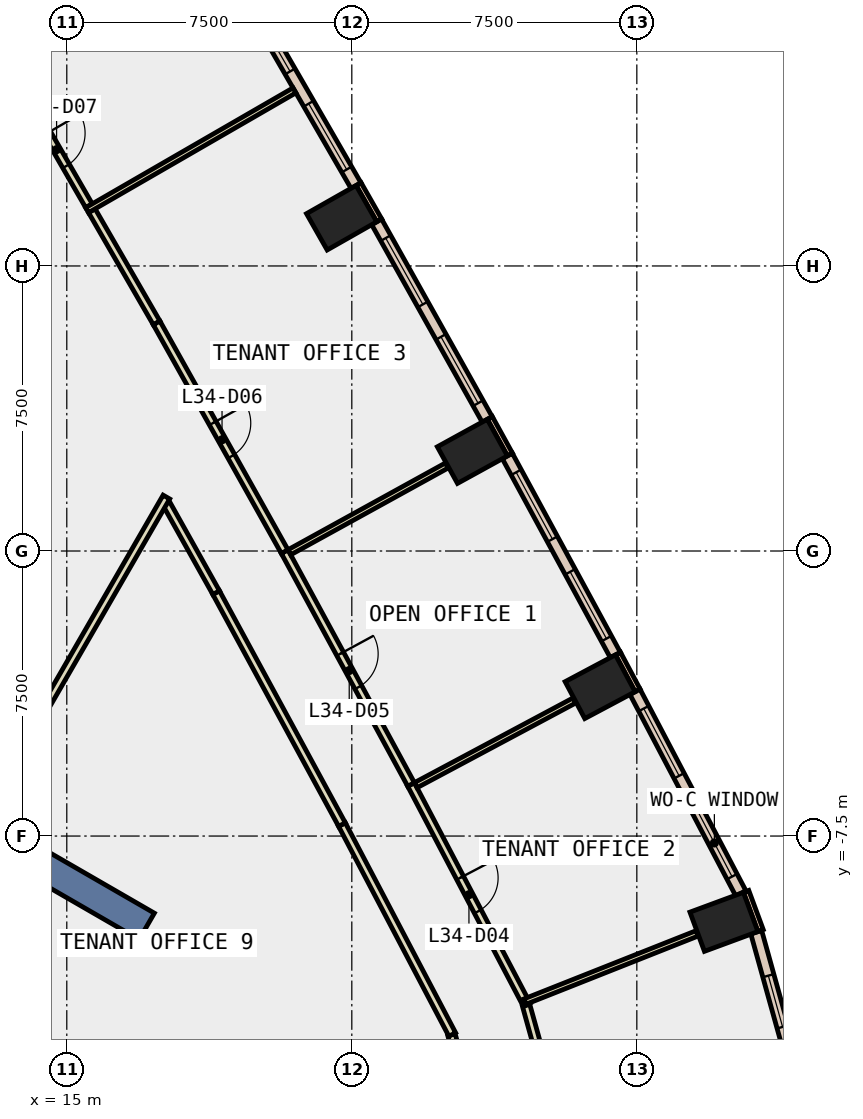
"""IFC4 building model, lengths in metres.
Left out: names, types, materials, properties, quantities, classifications, styles, units other than length and angle.
Written with IfcOpenShell. Run it as: python <this file> out.ifc"""

import sys

from ifc_helpers import new_model, si_unit, direction, frame, frame_2d, origin, origin_2d, place, context, subcontext, project, spatial, rectangle, extrude, element, fill, save


model = new_model("IFC4")
c1 = context("Model", 3, precision=1e-05, world=origin(), true_north=direction((0.0, 1.0)))
c2 = subcontext(c1, "Body", "Model", "MODEL_VIEW")
j1 = project(units=[si_unit("LENGTHUNIT", "METRE"), si_unit("PLANEANGLEUNIT", "RADIAN")], contexts=[c1])
p1 = place(None, origin())
s1 = spatial("IfcSite", under=j1, at=p1, CompositionType="ELEMENT")
p2 = place(p1, origin())
s2 = spatial("IfcBuilding", under=s1, at=p2, CompositionType="ELEMENT")
p3 = place(p2, frame((0.0, 0.0, 155.0)))
s3 = spatial("IfcBuildingStorey", under=s2, at=p3, CompositionType="ELEMENT", Elevation=155.0)
for number, where, z_axis, x_axis in (
    (1, (32.292, -9.758, -0.4), (0.0, 0.0, 1.0), (-0.347, 0.938, 0.0)),
    (2, (29.034, -3.571, -0.4), (0.0, 0.0, 1.0), (-0.47, 0.883, 0.0)),
    (3, (25.673, 2.622, -0.4), (0.0, 0.0, 1.0), (-0.482, 0.876, 0.0)),
    (4, (22.232, 8.769, -0.4), (0.0, 0.0, 1.0), (-0.494, 0.869, 0.0)),
):
    element("IfcColumn", number, at=place(p3, frame(where, z_axis=z_axis, x_axis=x_axis)), inside=s3, PredefinedType="COLUMN", context=c2, shape_type="SweptSolid", body=[
        extrude(rectangle(XDim=1.1, YDim=1.5, at=origin_2d()), origin(), (0.0, 0.0, 1.0), 4.2),
    ])
p4 = place(p3, frame((9.31, -5.375, -0.4), z_axis=(0.0, 0.0, 1.0), x_axis=(0.866017533419, -0.500013631625, 0.0)))
e5 = element("IfcWall", 5, at=p4, inside=s3, PredefinedType="SHEAR", context=c2, shape_type="SweptSolid", body=[
    extrude(rectangle(XDim=9.0, YDim=0.8, at=frame_2d((4.5, 0.0))), origin(), (0.0, 0.0, 1.0), 4.2),
])
for number, where, z_axis, x_axis in (
    (6, (33.256, -9.988, 0.0), (0.0, 0.0, 1.0), (-0.346, 0.938, 0.0)),
    (7, (30.02, -3.669, 0.0), (0.0, 0.0, 1.0), (-0.47, 0.883, 0.0)),
):
    element("IfcWall", number, at=place(p3, frame(where, z_axis=z_axis, x_axis=x_axis)), inside=s3, PredefinedType="STANDARD", context=c2, shape_type="SweptSolid", body=[
        extrude(rectangle(XDim=1.1, YDim=0.15, at=frame_2d((0.55, 0.0))), origin(), (0.0, 0.0, 1.0), 3.8),
    ])
for number, where, z_axis, x_axis in (
    (8, (26.661, 2.538, 0.0), (0.0, 0.0, 1.0), (-0.482, 0.876, 0.0)),
    (9, (23.222, 8.699, 0.0), (0.0, 0.0, 1.0), (-0.495, 0.869, 0.0)),
):
    element("IfcWall", number, at=place(p3, frame(where, z_axis=z_axis, x_axis=x_axis)), inside=s3, PredefinedType="STANDARD", context=c2, shape_type="SweptSolid", body=[
        extrude(rectangle(XDim=1.1, YDim=0.15, at=frame_2d((0.55, 0.0))), origin(), (0.0, 0.0, 1.0), 3.8),
    ])
p5 = place(p3, frame((34.154, -13.667, 0.0), z_axis=(0.0, 0.0, 1.0), x_axis=(-0.26799398221, 0.963420585985, 0.0)))
e10 = element("IfcWall", 10, at=p5, inside=s3, PredefinedType="STANDARD", context=c2, shape_type="SweptSolid", body=[
    extrude(rectangle(XDim=3.776, YDim=0.3, at=frame_2d((1.888, 0.0))), origin(), (0.0, 0.0, 1.0), 3.8),
])
p6 = place(p5, frame((1.188, 0.0, 0.9)))
e11 = element("IfcOpeningElement", 11, at=p6, cuts=e10, PredefinedType="OPENING", context=c2, shape_type="SweptSolid", body=[
    extrude(rectangle(XDim=1.4, YDim=2.6, at=frame_2d((0.7, 1.3))), frame((0.0, 0.16, 0.0), z_axis=(0.0, -1.0, 0.0), x_axis=(1.0, 0.0, 0.0)), (0.0, 0.0, 1.0), 0.32),
])
p7 = place(p3, frame((32.737, -9.008, 0.0), z_axis=(0.0, 0.0, 1.0), x_axis=(-0.465104650407, 0.885255705528, 0.0)))
e12 = element("IfcWall", 12, at=p7, inside=s3, PredefinedType="STANDARD", context=c2, shape_type="SweptSolid", body=[
    extrude(rectangle(XDim=5.99, YDim=0.3, at=frame_2d((2.995, 0.0))), origin(), (0.0, 0.0, 1.0), 3.8),
])
p8 = place(p7, frame((0.498, 0.0, 0.9)))
e13 = element("IfcOpeningElement", 13, at=p8, cuts=e12, PredefinedType="OPENING", context=c2, shape_type="SweptSolid", body=[
    extrude(rectangle(XDim=2.0, YDim=2.6, at=frame_2d((1.0, 1.3))), frame((0.0, 0.16, 0.0), z_axis=(0.0, -1.0, 0.0), x_axis=(1.0, 0.0, 0.0)), (0.0, 0.0, 1.0), 0.32),
])
p9 = place(p7, frame((3.493, 0.0, 0.9)))
e14 = element("IfcOpeningElement", 14, at=p9, cuts=e12, PredefinedType="OPENING", context=c2, shape_type="SweptSolid", body=[
    extrude(rectangle(XDim=2.0, YDim=2.6, at=frame_2d((1.0, 1.3))), frame((0.0, 0.16, 0.0), z_axis=(0.0, -1.0, 0.0), x_axis=(1.0, 0.0, 0.0)), (0.0, 0.0, 1.0), 0.32),
])
p10 = place(p3, frame((29.434, -2.736, 0.0), z_axis=(0.0, 0.0, 1.0), x_axis=(-0.476970695077, 0.878919197673, 0.0)))
e15 = element("IfcWall", 15, at=p10, inside=s3, PredefinedType="STANDARD", context=c2, shape_type="SweptSolid", body=[
    extrude(rectangle(XDim=5.958, YDim=0.3, at=frame_2d((2.979, 0.0))), origin(), (0.0, 0.0, 1.0), 3.8),
])
p11 = place(p10, frame((0.49, 0.0, 0.9)))
e16 = element("IfcOpeningElement", 16, at=p11, cuts=e15, PredefinedType="OPENING", context=c2, shape_type="SweptSolid", body=[
    extrude(rectangle(XDim=2.0, YDim=2.6, at=frame_2d((1.0, 1.3))), frame((0.0, 0.16, 0.0), z_axis=(0.0, -1.0, 0.0), x_axis=(1.0, 0.0, 0.0)), (0.0, 0.0, 1.0), 0.32),
])
p12 = place(p10, frame((3.469, 0.0, 0.9)))
e17 = element("IfcOpeningElement", 17, at=p12, cuts=e15, PredefinedType="OPENING", context=c2, shape_type="SweptSolid", body=[
    extrude(rectangle(XDim=2.0, YDim=2.6, at=frame_2d((1.0, 1.3))), frame((0.0, 0.16, 0.0), z_axis=(0.0, -1.0, 0.0), x_axis=(1.0, 0.0, 0.0)), (0.0, 0.0, 1.0), 0.32),
])
p13 = place(p3, frame((26.062, 3.463, 0.0), z_axis=(0.0, 0.0, 1.0), x_axis=(-0.488354983501, 0.872645065356, 0.0)))
e18 = element("IfcWall", 18, at=p13, inside=s3, PredefinedType="STANDARD", context=c2, shape_type="SweptSolid", body=[
    extrude(rectangle(XDim=5.957, YDim=0.3, at=frame_2d((2.978, 0.0))), origin(), (0.0, 0.0, 1.0), 3.8),
])
p14 = place(p13, frame((0.489, 0.0, 0.9)))
e19 = element("IfcOpeningElement", 19, at=p14, cuts=e18, PredefinedType="OPENING", context=c2, shape_type="SweptSolid", body=[
    extrude(rectangle(XDim=2.0, YDim=2.6, at=frame_2d((1.0, 1.3))), frame((0.0, 0.16, 0.0), z_axis=(0.0, -1.0, 0.0), x_axis=(1.0, 0.0, 0.0)), (0.0, 0.0, 1.0), 0.32),
])
p15 = place(p13, frame((3.467, 0.0, 0.9)))
e20 = element("IfcOpeningElement", 20, at=p15, cuts=e18, PredefinedType="OPENING", context=c2, shape_type="SweptSolid", body=[
    extrude(rectangle(XDim=2.0, YDim=2.6, at=frame_2d((1.0, 1.3))), frame((0.0, 0.16, 0.0), z_axis=(0.0, -1.0, 0.0), x_axis=(1.0, 0.0, 0.0)), (0.0, 0.0, 1.0), 0.32),
])
p16 = place(p3, frame((22.61, 9.615, 0.0), z_axis=(0.0, 0.0, 1.0), x_axis=(-0.500061823953, 0.865989706766, 0.0)))
e21 = element("IfcWall", 21, at=p16, inside=s3, PredefinedType="STANDARD", context=c2, shape_type="SweptSolid", body=[
    extrude(rectangle(XDim=5.957, YDim=0.3, at=frame_2d((2.979, 0.0))), origin(), (0.0, 0.0, 1.0), 3.8),
])
p17 = place(p16, frame((0.489, 0.0, 0.9)))
e22 = element("IfcOpeningElement", 22, at=p17, cuts=e21, PredefinedType="OPENING", context=c2, shape_type="SweptSolid", body=[
    extrude(rectangle(XDim=2.0, YDim=2.6, at=frame_2d((1.0, 1.3))), frame((0.0, 0.16, 0.0), z_axis=(0.0, -1.0, 0.0), x_axis=(1.0, 0.0, 0.0)), (0.0, 0.0, 1.0), 0.32),
])
p18 = place(p16, frame((3.468, 0.0, 0.9)))
e23 = element("IfcOpeningElement", 23, at=p18, cuts=e21, PredefinedType="OPENING", context=c2, shape_type="SweptSolid", body=[
    extrude(rectangle(XDim=2.0, YDim=2.6, at=frame_2d((1.0, 1.3))), frame((0.0, 0.16, 0.0), z_axis=(0.0, -1.0, 0.0), x_axis=(1.0, 0.0, 0.0)), (0.0, 0.0, 1.0), 0.32),
])
p19 = place(p3, frame((25.586, -14.393, 0.0), z_axis=(0.0, 0.0, 1.0), x_axis=(-0.268139825244, 0.963380005044, 0.0)))
e24 = element("IfcWall", 24, at=p19, inside=s3, PredefinedType="PARTITIONING", context=c2, shape_type="SweptSolid", body=[
    extrude(rectangle(XDim=1.726, YDim=0.2, at=frame_2d((0.863, 0.0))), origin(), (0.0, 0.0, 1.0), 3.8),
])
p20 = place(p3, frame((25.143, -12.722, 0.0), z_axis=(0.0, 0.0, 1.0), x_axis=(-0.465089990515, 0.885263407536, 0.0)))
e25 = element("IfcWall", 25, at=p20, inside=s3, PredefinedType="PARTITIONING", context=c2, shape_type="SweptSolid", body=[
    extrude(rectangle(XDim=6.24, YDim=0.2, at=frame_2d((3.12, 0.0))), origin(), (0.0, 0.0, 1.0), 3.8),
])
p21 = place(p3, frame((22.241, -7.198, 0.0), z_axis=(0.0, 0.0, 1.0), x_axis=(-0.476865268044, 0.878976402489, 0.0)))
e26 = element("IfcWall", 26, at=p21, inside=s3, PredefinedType="PARTITIONING", context=c2, shape_type="SweptSolid", body=[
    extrude(rectangle(XDim=6.943, YDim=0.2, at=frame_2d((3.472, 0.0))), origin(), (0.0, 0.0, 1.0), 3.8),
])
p22 = place(p3, frame((18.93, -1.095, 0.0), z_axis=(0.0, 0.0, 1.0), x_axis=(-0.488268004118, 0.872693735599, 0.0)))
e27 = element("IfcWall", 27, at=p22, inside=s3, PredefinedType="PARTITIONING", context=c2, shape_type="SweptSolid", body=[
    extrude(rectangle(XDim=2.683, YDim=0.2, at=frame_2d((1.341, 0.0))), origin(), (0.0, 0.0, 1.0), 3.8),
])
p23 = place(p3, frame((27.086, -11.952, 0.0), z_axis=(0.0, 0.0, 1.0), x_axis=(0.267909096687, -0.963444194498, 0.0)))
e28 = element("IfcWall", 28, at=p23, inside=s3, PredefinedType="PARTITIONING", context=c2, shape_type="SweptSolid", body=[
    extrude(rectangle(XDim=2.516, YDim=0.2, at=frame_2d((1.258, 0.0))), origin(), (0.0, 0.0, 1.0), 3.8),
])
p24 = place(p3, frame((24.059, -6.143, 0.0), z_axis=(0.0, 0.0, 1.0), x_axis=(0.464993808059, -0.885313932154, 0.0)))
e29 = element("IfcWall", 29, at=p24, inside=s3, PredefinedType="PARTITIONING", context=c2, shape_type="SweptSolid", body=[
    extrude(rectangle(XDim=6.552, YDim=0.2, at=frame_2d((3.276, 0.0))), origin(), (0.0, 0.0, 1.0), 3.8),
])
p25 = place(p24, frame((2.776, 0.0, 0.0)))
e30 = element("IfcOpeningElement", 30, at=p25, cuts=e29, PredefinedType="OPENING", context=c2, shape_type="SweptSolid", body=[
    extrude(rectangle(XDim=1.0, YDim=2.1, at=frame_2d((0.5, 1.05))), frame((0.0, 0.11, 0.0), z_axis=(0.0, -1.0, 0.0), x_axis=(1.0, 0.0, 0.0)), (0.0, 0.0, 1.0), 0.22),
])
p26 = place(p3, frame((20.733, -0.016, 0.0), z_axis=(0.0, 0.0, 1.0), x_axis=(0.477104227839, -0.87884671916, 0.0)))
e31 = element("IfcWall", 31, at=p26, inside=s3, PredefinedType="PARTITIONING", context=c2, shape_type="SweptSolid", body=[
    extrude(rectangle(XDim=6.972, YDim=0.2, at=frame_2d((3.486, 0.0))), origin(), (0.0, 0.0, 1.0), 3.8),
])
p27 = place(p26, frame((3.061, 0.0, 0.0)))
e32 = element("IfcOpeningElement", 32, at=p27, cuts=e31, PredefinedType="OPENING", context=c2, shape_type="SweptSolid", body=[
    extrude(rectangle(XDim=1.0, YDim=2.1, at=frame_2d((0.5, 1.05))), frame((0.0, 0.11, 0.0), z_axis=(0.0, -1.0, 0.0), x_axis=(1.0, 0.0, 0.0)), (0.0, 0.0, 1.0), 0.22),
])
p28 = place(p3, frame((15.659, 8.954, 0.0), z_axis=(0.0, 0.0, 1.0), x_axis=(0.50001992892, -0.866013897511, 0.0)))
e33 = element("IfcWall", 33, at=p28, inside=s3, PredefinedType="PARTITIONING", context=c2, shape_type="SweptSolid", body=[
    extrude(rectangle(XDim=3.41, YDim=0.2, at=frame_2d((1.705, 0.0))), origin(), (0.0, 0.0, 1.0), 3.8),
])
p29 = place(p3, frame((17.364, 6.001, 0.0), z_axis=(0.0, 0.0, 1.0), x_axis=(0.488528981592, -0.872547668695, 0.0)))
e34 = element("IfcWall", 34, at=p29, inside=s3, PredefinedType="PARTITIONING", context=c2, shape_type="SweptSolid", body=[
    extrude(rectangle(XDim=6.896, YDim=0.2, at=frame_2d((3.448, 0.0))), origin(), (0.0, 0.0, 1.0), 3.8),
])
p30 = place(p29, frame((3.023, 0.0, 0.0)))
e35 = element("IfcOpeningElement", 35, at=p30, cuts=e34, PredefinedType="OPENING", context=c2, shape_type="SweptSolid", body=[
    extrude(rectangle(XDim=1.0, YDim=2.1, at=frame_2d((0.5, 1.05))), frame((0.0, 0.11, 0.0), z_axis=(0.0, -1.0, 0.0), x_axis=(1.0, 0.0, 0.0)), (0.0, 0.0, 1.0), 0.22),
])
p31 = place(p3, frame((13.879, 12.037, 0.0), z_axis=(0.0, 0.0, 1.0), x_axis=(0.50001992892, -0.866013897511, 0.0)))
e36 = element("IfcWall", 36, at=p31, inside=s3, PredefinedType="PARTITIONING", context=c2, shape_type="SweptSolid", body=[
    extrude(rectangle(XDim=3.41, YDim=0.2, at=frame_2d((1.705, 0.0))), origin(), (0.0, 0.0, 1.0), 3.8),
])
p32 = place(p31, frame((1.205, 0.0, 0.0)))
e37 = element("IfcOpeningElement", 37, at=p32, cuts=e36, PredefinedType="OPENING", context=c2, shape_type="SweptSolid", body=[
    extrude(rectangle(XDim=1.0, YDim=2.1, at=frame_2d((0.5, 1.05))), frame((0.0, 0.11, 0.0), z_axis=(0.0, -1.0, 0.0), x_axis=(1.0, 0.0, 0.0)), (0.0, 0.0, 1.0), 0.22),
])
p33 = place(p3, frame((17.621, 1.42, 0.0), z_axis=(0.0, 0.0, 1.0), x_axis=(-0.499987708133, -0.866032500381, 0.0)))
e38 = element("IfcWall", 38, at=p33, inside=s3, PredefinedType="PARTITIONING", context=c2, shape_type="SweptSolid", body=[
    extrude(rectangle(XDim=9.64, YDim=0.2, at=frame_2d((4.82, 0.0))), origin(), (0.0, 0.0, 1.0), 3.8),
])
p34 = place(p3, frame((27.059, -11.855, 0.0), z_axis=(0.0, 0.0, 1.0), x_axis=(0.92964843089, 0.368447818481, 0.0)))
e39 = element("IfcWall", 39, at=p34, inside=s3, PredefinedType="PARTITIONING", context=c2, shape_type="SweptSolid", body=[
    extrude(rectangle(XDim=4.866, YDim=0.15, at=frame_2d((2.433, 0.0))), origin(), (0.0, 0.0, 1.0), 3.8),
])
p35 = place(p3, frame((24.182, -6.162, 0.0), z_axis=(0.0, 0.0, 1.0), x_axis=(0.88214427755, 0.470979270866, 0.0)))
e40 = element("IfcWall", 40, at=p35, inside=s3, PredefinedType="PARTITIONING", context=c2, shape_type="SweptSolid", body=[
    extrude(rectangle(XDim=4.731, YDim=0.15, at=frame_2d((2.365, 0.0))), origin(), (0.0, 0.0, 1.0), 3.8),
])
p36 = place(p3, frame((20.857, -0.033, 0.0), z_axis=(0.0, 0.0, 1.0), x_axis=(0.875786153174, 0.482699299677, 0.0)))
e41 = element("IfcWall", 41, at=p36, inside=s3, PredefinedType="PARTITIONING", context=c2, shape_type="SweptSolid", body=[
    extrude(rectangle(XDim=4.729, YDim=0.15, at=frame_2d((2.365, 0.0))), origin(), (0.0, 0.0, 1.0), 3.8),
])
p37 = place(p3, frame((15.535, 8.969, 0.0), z_axis=(0.0, 0.0, 1.0), x_axis=(0.865951968193, 0.500127172609, 0.0)))
e42 = element("IfcWall", 42, at=p37, inside=s3, PredefinedType="PARTITIONING", context=c2, shape_type="SweptSolid", body=[
    extrude(rectangle(XDim=6.301, YDim=0.15, at=frame_2d((3.15, 0.0))), origin(), (0.0, 0.0, 1.0), 3.8),
])
p38 = place(p6, origin())
e43 = element("IfcWindow", 43, at=p38, inside=s3, PartitioningType="SINGLE_PANEL", PredefinedType="WINDOW", context=c2, shape_type="SweptSolid", body=[
    extrude(rectangle(XDim=1.4, YDim=2.6, at=frame_2d((0.7, 1.3))), frame((0.0, 0.03, 0.0), z_axis=(0.0, -1.0, 0.0), x_axis=(1.0, 0.0, 0.0)), (0.0, 0.0, 1.0), 0.06),
])
fill(e11, e43)
p39 = place(p8, origin())
e44 = element("IfcWindow", 44, at=p39, inside=s3, PartitioningType="SINGLE_PANEL", PredefinedType="WINDOW", context=c2, shape_type="SweptSolid", body=[
    extrude(rectangle(XDim=2.0, YDim=2.6, at=frame_2d((1.0, 1.3))), frame((0.0, 0.03, 0.0), z_axis=(0.0, -1.0, 0.0), x_axis=(1.0, 0.0, 0.0)), (0.0, 0.0, 1.0), 0.06),
])
fill(e13, e44)
p40 = place(p9, origin())
e45 = element("IfcWindow", 45, at=p40, inside=s3, PartitioningType="SINGLE_PANEL", PredefinedType="WINDOW", context=c2, shape_type="SweptSolid", body=[
    extrude(rectangle(XDim=2.0, YDim=2.6, at=frame_2d((1.0, 1.3))), frame((0.0, 0.03, 0.0), z_axis=(0.0, -1.0, 0.0), x_axis=(1.0, 0.0, 0.0)), (0.0, 0.0, 1.0), 0.06),
])
fill(e14, e45)
p41 = place(p11, origin())
e46 = element("IfcWindow", 46, at=p41, inside=s3, PartitioningType="SINGLE_PANEL", PredefinedType="WINDOW", context=c2, shape_type="SweptSolid", body=[
    extrude(rectangle(XDim=2.0, YDim=2.6, at=frame_2d((1.0, 1.3))), frame((0.0, 0.03, 0.0), z_axis=(0.0, -1.0, 0.0), x_axis=(1.0, 0.0, 0.0)), (0.0, 0.0, 1.0), 0.06),
])
fill(e16, e46)
p42 = place(p12, origin())
e47 = element("IfcWindow", 47, at=p42, inside=s3, PartitioningType="SINGLE_PANEL", PredefinedType="WINDOW", context=c2, shape_type="SweptSolid", body=[
    extrude(rectangle(XDim=2.0, YDim=2.6, at=frame_2d((1.0, 1.3))), frame((0.0, 0.03, 0.0), z_axis=(0.0, -1.0, 0.0), x_axis=(1.0, 0.0, 0.0)), (0.0, 0.0, 1.0), 0.06),
])
fill(e17, e47)
p43 = place(p14, origin())
e48 = element("IfcWindow", 48, at=p43, inside=s3, PartitioningType="SINGLE_PANEL", PredefinedType="WINDOW", context=c2, shape_type="SweptSolid", body=[
    extrude(rectangle(XDim=2.0, YDim=2.6, at=frame_2d((1.0, 1.3))), frame((0.0, 0.03, 0.0), z_axis=(0.0, -1.0, 0.0), x_axis=(1.0, 0.0, 0.0)), (0.0, 0.0, 1.0), 0.06),
])
fill(e19, e48)
p44 = place(p15, origin())
e49 = element("IfcWindow", 49, at=p44, inside=s3, PartitioningType="SINGLE_PANEL", PredefinedType="WINDOW", context=c2, shape_type="SweptSolid", body=[
    extrude(rectangle(XDim=2.0, YDim=2.6, at=frame_2d((1.0, 1.3))), frame((0.0, 0.03, 0.0), z_axis=(0.0, -1.0, 0.0), x_axis=(1.0, 0.0, 0.0)), (0.0, 0.0, 1.0), 0.06),
])
fill(e20, e49)
p45 = place(p17, origin())
e50 = element("IfcWindow", 50, at=p45, inside=s3, PartitioningType="SINGLE_PANEL", PredefinedType="WINDOW", context=c2, shape_type="SweptSolid", body=[
    extrude(rectangle(XDim=2.0, YDim=2.6, at=frame_2d((1.0, 1.3))), frame((0.0, 0.03, 0.0), z_axis=(0.0, -1.0, 0.0), x_axis=(1.0, 0.0, 0.0)), (0.0, 0.0, 1.0), 0.06),
])
fill(e22, e50)
p46 = place(p18, origin())
e51 = element("IfcWindow", 51, at=p46, inside=s3, PartitioningType="SINGLE_PANEL", PredefinedType="WINDOW", context=c2, shape_type="SweptSolid", body=[
    extrude(rectangle(XDim=2.0, YDim=2.6, at=frame_2d((1.0, 1.3))), frame((0.0, 0.03, 0.0), z_axis=(0.0, -1.0, 0.0), x_axis=(1.0, 0.0, 0.0)), (0.0, 0.0, 1.0), 0.06),
])
fill(e23, e51)
p47 = place(p25, origin())
e52 = element("IfcDoor", 52, at=p47, inside=s3, OperationType="SINGLE_SWING_LEFT", PredefinedType="DOOR", context=c2, shape_type="SweptSolid", body=[
    extrude(rectangle(XDim=1.0, YDim=2.1, at=frame_2d((0.5, 1.05))), frame((0.0, 0.025, 0.0), z_axis=(0.0, -1.0, 0.0), x_axis=(1.0, 0.0, 0.0)), (0.0, 0.0, 1.0), 0.05),
])
fill(e30, e52)
p48 = place(p27, origin())
e53 = element("IfcDoor", 53, at=p48, inside=s3, OperationType="SINGLE_SWING_LEFT", PredefinedType="DOOR", context=c2, shape_type="SweptSolid", body=[
    extrude(rectangle(XDim=1.0, YDim=2.1, at=frame_2d((0.5, 1.05))), frame((0.0, 0.025, 0.0), z_axis=(0.0, -1.0, 0.0), x_axis=(1.0, 0.0, 0.0)), (0.0, 0.0, 1.0), 0.05),
])
fill(e32, e53)
p49 = place(p30, origin())
e54 = element("IfcDoor", 54, at=p49, inside=s3, OperationType="SINGLE_SWING_LEFT", PredefinedType="DOOR", context=c2, shape_type="SweptSolid", body=[
    extrude(rectangle(XDim=1.0, YDim=2.1, at=frame_2d((0.5, 1.05))), frame((0.0, 0.025, 0.0), z_axis=(0.0, -1.0, 0.0), x_axis=(1.0, 0.0, 0.0)), (0.0, 0.0, 1.0), 0.05),
])
fill(e35, e54)
p50 = place(p32, origin())
e55 = element("IfcDoor", 55, at=p50, inside=s3, OperationType="SINGLE_SWING_LEFT", PredefinedType="DOOR", context=c2, shape_type="SweptSolid", body=[
    extrude(rectangle(XDim=1.0, YDim=2.1, at=frame_2d((0.5, 1.05))), frame((0.0, 0.025, 0.0), z_axis=(0.0, -1.0, 0.0), x_axis=(1.0, 0.0, 0.0)), (0.0, 0.0, 1.0), 0.05),
])
fill(e37, e55)
save(model, sys.argv[1])
